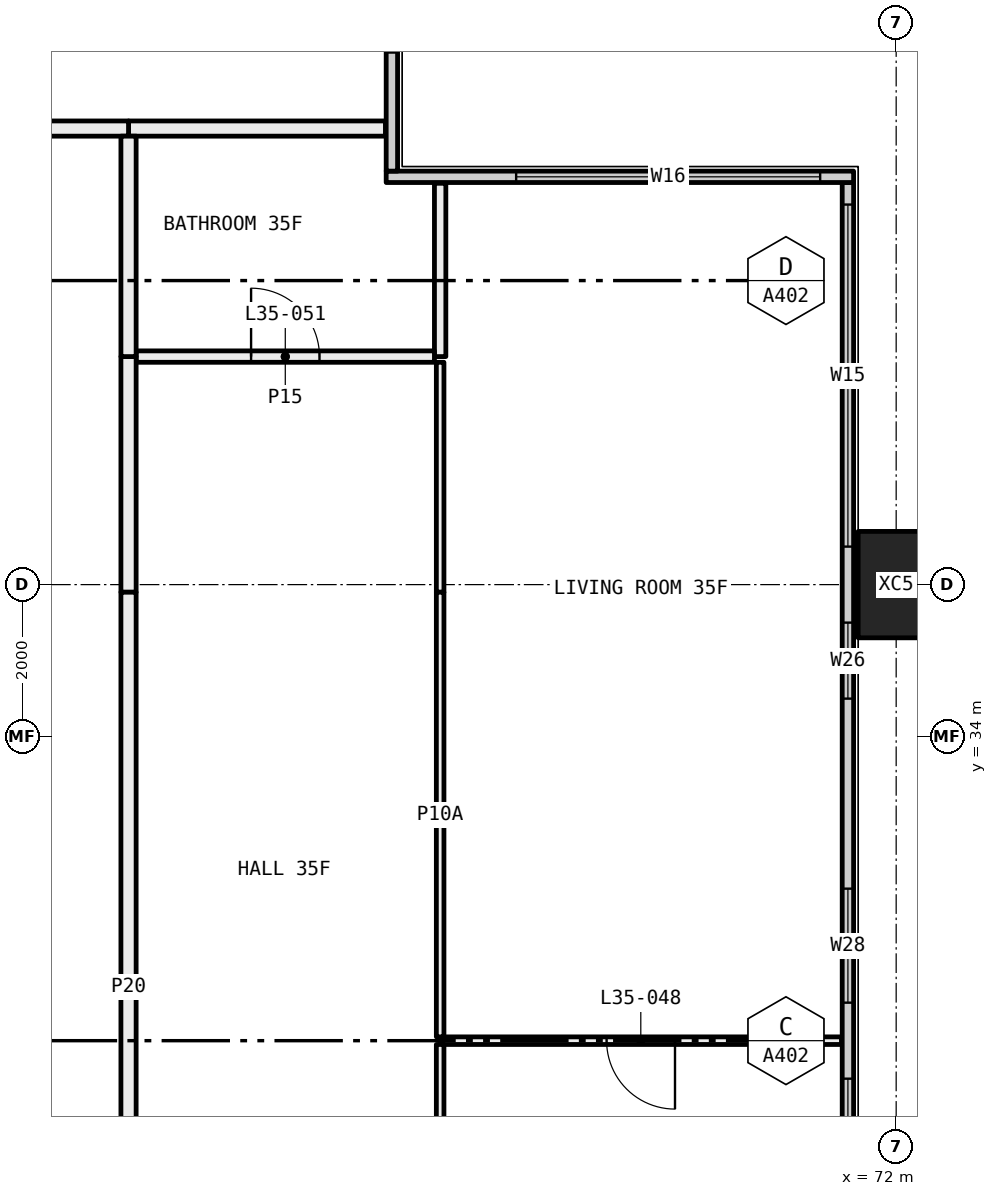
"""IFC4 building model, lengths in metres.
Left out: names, types, materials, properties, quantities, classifications, styles, units other than length and angle.
Written with IfcOpenShell. Run it as: python <this file> out.ifc"""

import sys

from ifc_helpers import new_model, si_unit, direction, frame, frame_2d, origin, origin_2d, place, context, subcontext, project, spatial, rectangle, hollow_rectangle, extrude, element, fill, save


model = new_model("IFC4")
c1 = context("Model", 3, precision=1e-05, world=origin(), true_north=direction((0.0, 1.0)))
c2 = subcontext(c1, "Body", "Model", "MODEL_VIEW")
j1 = project(units=[si_unit("LENGTHUNIT", "METRE"), si_unit("PLANEANGLEUNIT", "RADIAN")], contexts=[c1])
p1 = place(None, origin())
s1 = spatial("IfcSite", under=j1, at=p1, CompositionType="ELEMENT")
p2 = place(p1, origin())
s2 = spatial("IfcBuilding", under=s1, at=p2, CompositionType="ELEMENT")
p3 = place(p2, frame((0.0, 0.0, 134.55)))
s3 = spatial("IfcBuildingStorey", under=s2, at=p3, CompositionType="ELEMENT", Elevation=134.55)
p4 = place(p3, frame((72.0, 36.0, -0.4), z_axis=(0.0, 0.0, 1.0), x_axis=(0.0, 1.0, 0.0)))
e1 = element("IfcColumn", 1, at=p4, inside=s3, PredefinedType="COLUMN", context=c2, shape_type="SweptSolid", body=[
    extrude(hollow_rectangle(XDim=1.4, YDim=1.0, WallThickness=0.055, at=origin_2d()), origin(), (0.0, 0.0, 1.0), 3.45),
])
p5 = place(p3, frame((71.365, 18.71, 0.0), z_axis=(0.0, 0.0, 1.0), x_axis=(0.0, 1.0, 0.0)))
e2 = element("IfcWall", 2, at=p5, inside=s3, PredefinedType="ELEMENTEDWALL", context=c2, shape_type="SweptSolid", body=[
    extrude(rectangle(XDim=22.58, YDim=0.15, at=frame_2d((11.29, 0.0))), origin(), (0.0, 0.0, 1.0), 3.05),
])
p6 = place(p5, frame((0.29, 0.0, 0.45)))
e3 = element("IfcOpeningElement", 3, at=p6, cuts=e2, PredefinedType="OPENING", context=c2, shape_type="SweptSolid", body=[
    extrude(rectangle(XDim=4.5, YDim=2.55, at=frame_2d((2.25, 1.275))), frame((0.0, 0.085, 0.0), z_axis=(0.0, -1.0, 0.0), x_axis=(1.0, 0.0, 0.0)), (0.0, 0.0, 1.0), 0.17),
])
p7 = place(p5, frame((5.79, 0.0, 0.45)))
e4 = element("IfcOpeningElement", 4, at=p7, cuts=e2, PredefinedType="OPENING", context=c2, shape_type="SweptSolid", body=[
    extrude(rectangle(XDim=1.0, YDim=2.55, at=frame_2d((0.5, 1.275))), frame((0.0, 0.085, 0.0), z_axis=(0.0, -1.0, 0.0), x_axis=(1.0, 0.0, 0.0)), (0.0, 0.0, 1.0), 0.17),
])
p8 = place(p5, frame((9.29, 0.0, 0.45)))
e5 = element("IfcOpeningElement", 5, at=p8, cuts=e2, PredefinedType="OPENING", context=c2, shape_type="SweptSolid", body=[
    extrude(rectangle(XDim=1.5, YDim=2.55, at=frame_2d((0.75, 1.275))), frame((0.0, 0.085, 0.0), z_axis=(0.0, -1.0, 0.0), x_axis=(1.0, 0.0, 0.0)), (0.0, 0.0, 1.0), 0.17),
])
p9 = place(p5, frame((11.79, 0.0, 0.45)))
e6 = element("IfcOpeningElement", 6, at=p9, cuts=e2, PredefinedType="OPENING", context=c2, shape_type="SweptSolid", body=[
    extrude(rectangle(XDim=1.5, YDim=2.55, at=frame_2d((0.75, 1.275))), frame((0.0, 0.085, 0.0), z_axis=(0.0, -1.0, 0.0), x_axis=(1.0, 0.0, 0.0)), (0.0, 0.0, 1.0), 0.17),
])
p10 = place(p5, frame((15.79, 0.0, 0.45)))
e7 = element("IfcOpeningElement", 7, at=p10, cuts=e2, PredefinedType="OPENING", context=c2, shape_type="SweptSolid", body=[
    extrude(rectangle(XDim=1.0, YDim=2.55, at=frame_2d((0.5, 1.275))), frame((0.0, 0.085, 0.0), z_axis=(0.0, -1.0, 0.0), x_axis=(1.0, 0.0, 0.0)), (0.0, 0.0, 1.0), 0.17),
])
p11 = place(p5, frame((17.79, 0.0, 0.45)))
e8 = element("IfcOpeningElement", 8, at=p11, cuts=e2, PredefinedType="OPENING", context=c2, shape_type="SweptSolid", body=[
    extrude(rectangle(XDim=4.5, YDim=2.55, at=frame_2d((2.25, 1.275))), frame((0.0, 0.085, 0.0), z_axis=(0.0, -1.0, 0.0), x_axis=(1.0, 0.0, 0.0)), (0.0, 0.0, 1.0), 0.17),
])
p12 = place(p3, frame((65.29, 41.365, 0.0), z_axis=(0.0, 0.0, 1.0), x_axis=(1.0, 0.0, 0.0)))
e9 = element("IfcWall", 9, at=p12, inside=s3, PredefinedType="ELEMENTEDWALL", context=c2, shape_type="SweptSolid", body=[
    extrude(rectangle(XDim=6.15, YDim=0.15, at=frame_2d((3.075, 0.0))), origin(), (0.0, 0.0, 1.0), 3.05),
])
p13 = place(p12, frame((1.71, 0.0, 0.45)))
e10 = element("IfcOpeningElement", 10, at=p13, cuts=e9, PredefinedType="OPENING", context=c2, shape_type="SweptSolid", body=[
    extrude(rectangle(XDim=4.0, YDim=2.55, at=frame_2d((2.0, 1.275))), frame((0.0, 0.085, 0.0), z_axis=(0.0, -1.0, 0.0), x_axis=(1.0, 0.0, 0.0)), (0.0, 0.0, 1.0), 0.17),
])
p14 = place(p3, frame((65.365, 41.44, 0.0), z_axis=(0.0, 0.0, 1.0), x_axis=(0.0, 1.0, 0.0)))
e11 = element("IfcWall", 11, at=p14, inside=s3, PredefinedType="ELEMENTEDWALL", context=c2, shape_type="SweptSolid", body=[
    extrude(rectangle(XDim=5.85, YDim=0.15, at=frame_2d((2.925, 0.0))), origin(), (0.0, 0.0, 1.0), 3.05),
])
p15 = place(p14, frame((1.56, 0.0, 0.45)))
e12 = element("IfcOpeningElement", 12, at=p15, cuts=e11, PredefinedType="OPENING", context=c2, shape_type="SweptSolid", body=[
    extrude(rectangle(XDim=4.0, YDim=2.55, at=frame_2d((2.0, 1.275))), frame((0.0, 0.085, 0.0), z_axis=(0.0, -1.0, 0.0), x_axis=(1.0, 0.0, 0.0)), (0.0, 0.0, 1.0), 0.17),
])
p16 = place(p3, frame((61.9, 42.0, 0.0), z_axis=(0.0, 0.0, 1.0), x_axis=(1.0, 0.0, 0.0)))
e13 = element("IfcWall", 13, at=p16, inside=s3, PredefinedType="PARTITIONING", context=c2, shape_type="SweptSolid", body=[
    extrude(rectangle(XDim=3.38, YDim=0.2, at=frame_2d((1.69, 0.0))), origin(), (0.0, 0.0, 1.0), 3.05),
])
p17 = place(p3, frame((60.0, 42.0, 0.0), z_axis=(0.0, 0.0, 1.0), x_axis=(1.0, 0.0, 0.0)))
e14 = element("IfcWall", 14, at=p17, inside=s3, PredefinedType="PARTITIONING", context=c2, shape_type="SweptSolid", body=[
    extrude(rectangle(XDim=1.9, YDim=0.2, at=frame_2d((0.95, 0.0))), origin(), (0.0, 0.0, 1.0), 3.05),
])
p18 = place(p3, frame((71.28, 30.0, 0.0), z_axis=(0.0, 0.0, 1.0), x_axis=(-1.0, 0.0, 0.0)))
e15 = element("IfcWall", 15, at=p18, inside=s3, PredefinedType="PARTITIONING", context=c2, shape_type="SweptSolid", body=[
    extrude(rectangle(XDim=5.28, YDim=0.1, at=frame_2d((2.64, 0.0))), origin(), (0.0, 0.0, 1.0), 3.05),
])
p19 = place(p18, frame((2.19, 0.0, 0.0)))
e16 = element("IfcOpeningElement", 16, at=p19, cuts=e15, PredefinedType="OPENING", context=c2, shape_type="SweptSolid", body=[
    extrude(rectangle(XDim=0.9, YDim=2.1, at=frame_2d((0.45, 1.05))), frame((0.0, 0.06, 0.0), z_axis=(0.0, -1.0, 0.0), x_axis=(1.0, 0.0, 0.0)), (0.0, 0.0, 1.0), 0.12),
])
p20 = place(p3, frame((66.0, 29.95, 0.0), z_axis=(0.0, 0.0, 1.0), x_axis=(0.0, -1.0, 0.0)))
e17 = element("IfcWall", 17, at=p20, inside=s3, PredefinedType="PARTITIONING", context=c2, shape_type="SweptSolid", body=[
    extrude(rectangle(XDim=4.45, YDim=0.1, at=frame_2d((2.225, 0.0))), origin(), (0.0, 0.0, 1.0), 3.05),
])
p21 = place(p3, frame((66.0, 38.925, 0.0), z_axis=(0.0, 0.0, 1.0), x_axis=(0.0, -1.0, 0.0)))
e18 = element("IfcWall", 18, at=p21, inside=s3, PredefinedType="PARTITIONING", context=c2, shape_type="SweptSolid", body=[
    extrude(rectangle(XDim=3.025, YDim=0.1, at=frame_2d((1.513, 0.0))), origin(), (0.0, 0.0, 1.0), 2.45),
])
p22 = place(p3, frame((66.0, 35.9, 0.0), z_axis=(0.0, 0.0, 1.0), x_axis=(0.0, -1.0, 0.0)))
e19 = element("IfcWall", 19, at=p22, inside=s3, PredefinedType="PARTITIONING", context=c2, shape_type="SweptSolid", body=[
    extrude(rectangle(XDim=5.85, YDim=0.1, at=frame_2d((2.925, 0.0))), origin(), (0.0, 0.0, 1.0), 3.05),
])
p23 = place(p3, frame((66.0, 41.28, 0.0), z_axis=(0.0, 0.0, 1.0), x_axis=(0.0, -1.0, 0.0)))
e20 = element("IfcWall", 20, at=p23, inside=s3, PredefinedType="PARTITIONING", context=c2, shape_type="SweptSolid", body=[
    extrude(rectangle(XDim=2.28, YDim=0.15, at=frame_2d((1.14, 0.0))), origin(), (0.0, 0.0, 1.0), 3.05),
])
p24 = place(p3, frame((65.925, 39.0, 0.0), z_axis=(0.0, 0.0, 1.0), x_axis=(-1.0, 0.0, 0.0)))
e21 = element("IfcWall", 21, at=p24, inside=s3, PredefinedType="PARTITIONING", context=c2, shape_type="SweptSolid", body=[
    extrude(rectangle(XDim=3.925, YDim=0.15, at=frame_2d((1.962, 0.0))), origin(), (0.0, 0.0, 1.0), 3.05),
])
p25 = place(p24, frame((1.512, 0.0, 0.0)))
e22 = element("IfcOpeningElement", 22, at=p25, cuts=e21, PredefinedType="OPENING", context=c2, shape_type="SweptSolid", body=[
    extrude(rectangle(XDim=0.9, YDim=2.1, at=frame_2d((0.45, 1.05))), frame((0.0, 0.085, 0.0), z_axis=(0.0, -1.0, 0.0), x_axis=(1.0, 0.0, 0.0)), (0.0, 0.0, 1.0), 0.17),
])
p26 = place(p3, frame((61.9, 39.0, 0.0), z_axis=(0.0, 0.0, 1.0), x_axis=(0.0, -1.0, 0.0)))
e23 = element("IfcWall", 23, at=p26, inside=s3, PredefinedType="PARTITIONING", context=c2, shape_type="SweptSolid", body=[
    extrude(rectangle(XDim=3.1, YDim=0.2, at=frame_2d((1.55, 0.0))), origin(), (0.0, 0.0, 1.0), 2.45),
])
p27 = place(p3, frame((61.9, 35.9, 0.0), z_axis=(0.0, 0.0, 1.0), x_axis=(0.0, -1.0, 0.0)))
e24 = element("IfcWall", 24, at=p27, inside=s3, PredefinedType="PARTITIONING", context=c2, shape_type="SweptSolid", body=[
    extrude(rectangle(XDim=10.4, YDim=0.2, at=frame_2d((5.2, 0.0))), origin(), (0.0, 0.0, 1.0), 3.05),
])
p28 = place(p3, frame((61.9, 41.9, 0.0), z_axis=(0.0, 0.0, 1.0), x_axis=(0.0, -1.0, 0.0)))
e25 = element("IfcWall", 25, at=p28, inside=s3, PredefinedType="PARTITIONING", context=c2, shape_type="SweptSolid", body=[
    extrude(rectangle(XDim=2.9, YDim=0.2, at=frame_2d((1.45, 0.0))), origin(), (0.0, 0.0, 1.0), 3.05),
])
p29 = place(p8, origin())
e26 = element("IfcWindow", 26, at=p29, inside=s3, PartitioningType="SINGLE_PANEL", PredefinedType="WINDOW", context=c2, shape_type="SweptSolid", body=[
    extrude(rectangle(XDim=1.5, YDim=2.55, at=frame_2d((0.75, 1.275))), frame((0.0, 0.03, 0.0), z_axis=(0.0, -1.0, 0.0), x_axis=(1.0, 0.0, 0.0)), (0.0, 0.0, 1.0), 0.06),
])
fill(e5, e26)
p30 = place(p9, origin())
e27 = element("IfcWindow", 27, at=p30, inside=s3, PartitioningType="SINGLE_PANEL", PredefinedType="WINDOW", context=c2, shape_type="SweptSolid", body=[
    extrude(rectangle(XDim=1.5, YDim=2.55, at=frame_2d((0.75, 1.275))), frame((0.0, 0.03, 0.0), z_axis=(0.0, -1.0, 0.0), x_axis=(1.0, 0.0, 0.0)), (0.0, 0.0, 1.0), 0.06),
])
fill(e6, e27)
p31 = place(p10, origin())
e28 = element("IfcWindow", 28, at=p31, inside=s3, PartitioningType="SINGLE_PANEL", PredefinedType="WINDOW", context=c2, shape_type="SweptSolid", body=[
    extrude(rectangle(XDim=1.0, YDim=2.55, at=frame_2d((0.5, 1.275))), frame((0.0, 0.03, 0.0), z_axis=(0.0, -1.0, 0.0), x_axis=(1.0, 0.0, 0.0)), (0.0, 0.0, 1.0), 0.06),
])
fill(e7, e28)
p32 = place(p11, origin())
e29 = element("IfcWindow", 29, at=p32, inside=s3, PartitioningType="SINGLE_PANEL", PredefinedType="WINDOW", context=c2, shape_type="SweptSolid", body=[
    extrude(rectangle(XDim=4.5, YDim=2.55, at=frame_2d((2.25, 1.275))), frame((0.0, 0.03, 0.0), z_axis=(0.0, -1.0, 0.0), x_axis=(1.0, 0.0, 0.0)), (0.0, 0.0, 1.0), 0.06),
])
fill(e8, e29)
p33 = place(p13, origin())
e30 = element("IfcWindow", 30, at=p33, inside=s3, PartitioningType="SINGLE_PANEL", PredefinedType="WINDOW", context=c2, shape_type="SweptSolid", body=[
    extrude(rectangle(XDim=4.0, YDim=2.55, at=frame_2d((2.0, 1.275))), frame((0.0, 0.03, 0.0), z_axis=(0.0, -1.0, 0.0), x_axis=(1.0, 0.0, 0.0)), (0.0, 0.0, 1.0), 0.06),
])
fill(e10, e30)
p34 = place(p19, origin())
e31 = element("IfcDoor", 31, at=p34, inside=s3, OperationType="SINGLE_SWING_RIGHT", PredefinedType="DOOR", context=c2, shape_type="SweptSolid", body=[
    extrude(rectangle(XDim=0.9, YDim=2.1, at=frame_2d((0.45, 1.05))), frame((0.0, 0.025, 0.0), z_axis=(0.0, -1.0, 0.0), x_axis=(1.0, 0.0, 0.0)), (0.0, 0.0, 1.0), 0.05),
])
fill(e16, e31)
p35 = place(p25, frame((0.9, 0.0, 0.0), x_axis=(-1.0, 0.0, 0.0)))
e32 = element("IfcDoor", 32, at=p35, inside=s3, OperationType="SINGLE_SWING_RIGHT", PredefinedType="DOOR", context=c2, shape_type="SweptSolid", body=[
    extrude(rectangle(XDim=0.9, YDim=2.1, at=frame_2d((0.45, 1.05))), frame((0.0, 0.025, 0.0), z_axis=(0.0, -1.0, 0.0), x_axis=(1.0, 0.0, 0.0)), (0.0, 0.0, 1.0), 0.05),
])
fill(e22, e32)
save(model, sys.argv[1])
